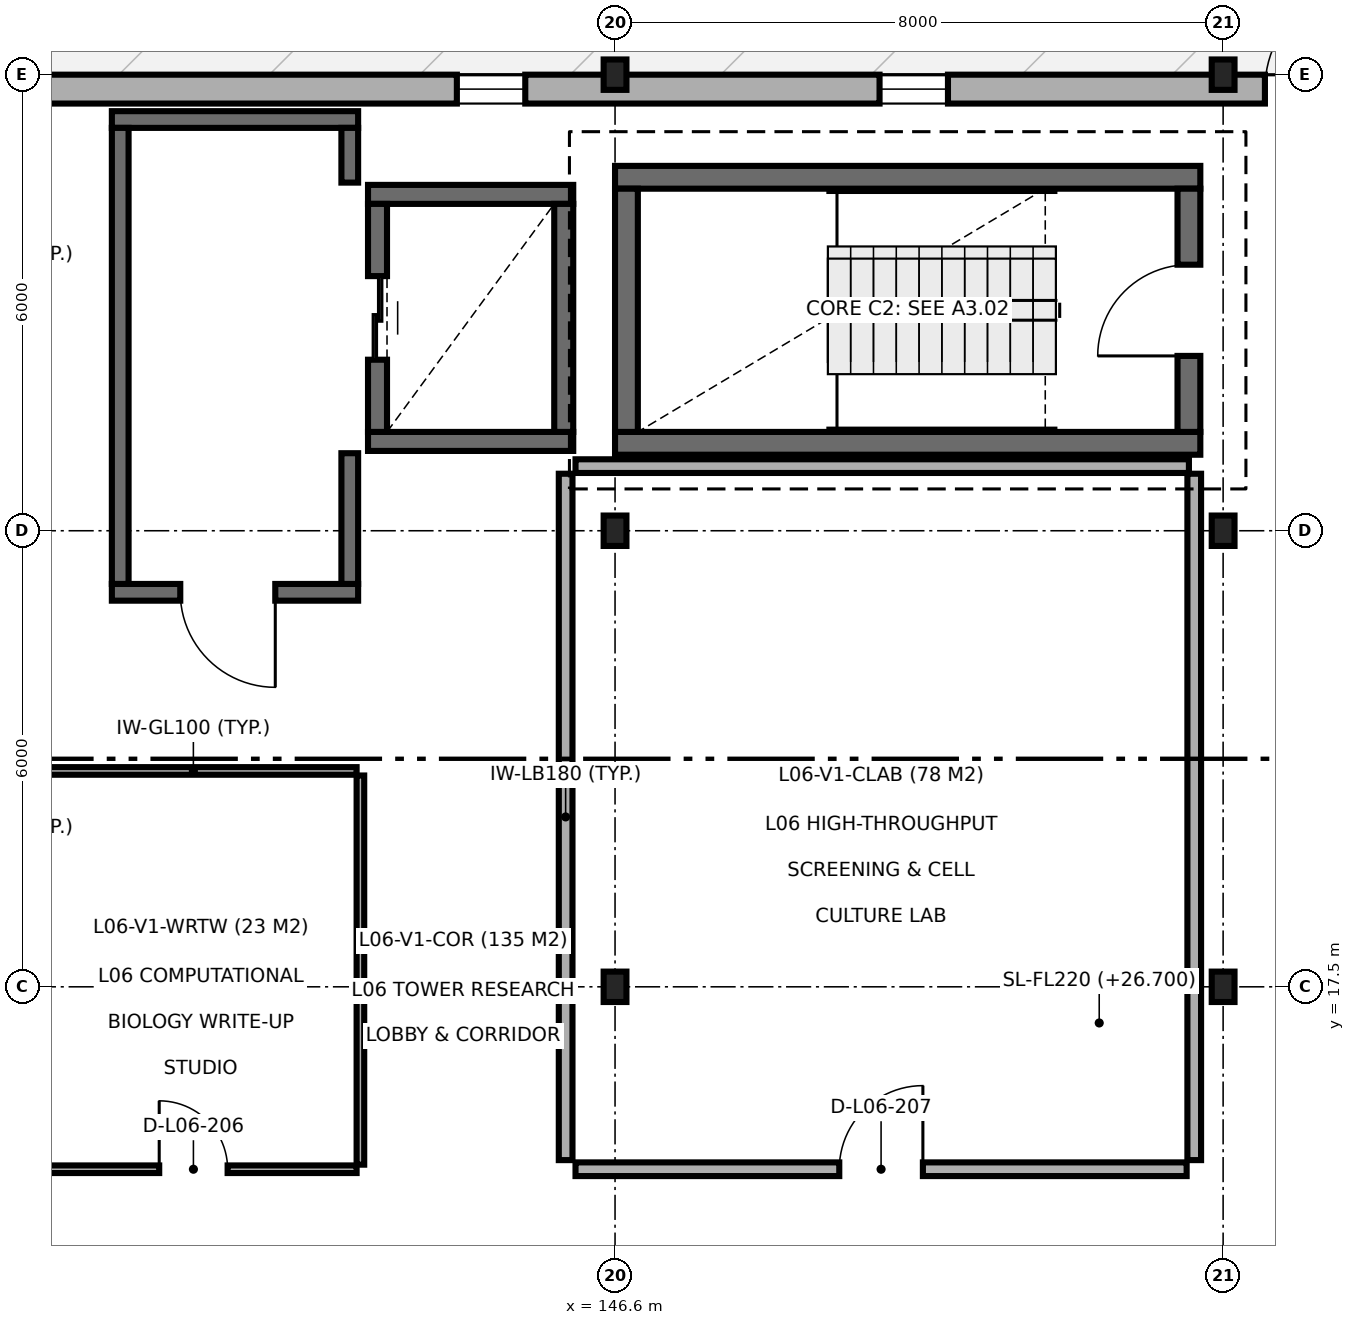
"""IFC4 building model, lengths in metres.
Left out: names, types, materials, properties, quantities, classifications, styles, units other than length and angle.
Written with IfcOpenShell. Run it as: python <this file> out.ifc"""

import sys

from ifc_helpers import new_model, si_unit, direction, frame, frame_2d, origin, origin_2d, place, context, subcontext, project, spatial, rectangle, i_section, extrude, element, fill, save


model = new_model("IFC4")
c1 = context("Model", 3, precision=1e-05, world=origin(), true_north=direction((0.0, 1.0)))
c2 = subcontext(c1, "Body", "Model", "MODEL_VIEW")
j1 = project(units=[si_unit("LENGTHUNIT", "METRE"), si_unit("PLANEANGLEUNIT", "RADIAN")], contexts=[c1])
p1 = place(None, origin())
s1 = spatial("IfcSite", under=j1, at=p1, CompositionType="ELEMENT")
p2 = place(p1, origin())
s2 = spatial("IfcBuilding", under=s1, at=p2, CompositionType="ELEMENT")
p3 = place(p2, frame((0.0, 0.0, 26.7)))
s3 = spatial("IfcBuildingStorey", under=s2, at=p3, CompositionType="ELEMENT", Elevation=26.7)
for number, where, z_axis, x_axis in (
    (1, (146.6, 17.5, 0.0), (0.0, 0.0, 1.0), (1.0, 0.0, 0.0)),
    (2, (146.6, 23.5, 0.0), (0.0, 0.0, 1.0), (1.0, 0.0, 0.0)),
    (3, (146.6, 29.5, 0.0), (0.0, 0.0, 1.0), (1.0, 0.0, 0.0)),
    (4, (154.6, 17.5, 0.0), (0.0, 0.0, 1.0), (1.0, 0.0, 0.0)),
    (5, (154.6, 23.5, 0.0), (0.0, 0.0, 1.0), (1.0, 0.0, 0.0)),
    (6, (154.6, 29.5, 0.0), (0.0, 0.0, 1.0), (1.0, 0.0, 0.0)),
):
    element("IfcColumn", number, at=place(p3, frame(where, z_axis=z_axis, x_axis=x_axis)), inside=s3, PredefinedType="COLUMN", context=c2, shape_type="SweptSolid", body=[
        extrude(i_section(OverallWidth=0.3, OverallDepth=0.4, WebThickness=0.013, FlangeThickness=0.024, FilletRadius=0.027, at=origin_2d()), origin(), (0.0, 0.0, 1.0), 3.9),
    ])
for number, where, z_axis, x_axis in (
    (7, (146.6, 24.65, 0.0), (0.0, 0.0, 1.0), (1.0, 0.0, 0.0)),
    (8, (154.3, 28.15, 0.0), (0.0, 0.0, 1.0), (-1.0, 0.0, 0.0)),
):
    element("IfcWall", number, at=place(p3, frame(where, z_axis=z_axis, x_axis=x_axis)), inside=s3, PredefinedType="SHEAR", context=c2, shape_type="SweptSolid", body=[
        extrude(rectangle(XDim=7.7, YDim=0.3, at=frame_2d((3.85, 0.0))), origin(), (0.0, 0.0, 1.0), 3.9),
    ])
p4 = place(p3, frame((146.75, 28.0, 0.0), z_axis=(0.0, 0.0, 1.0), x_axis=(0.0, -1.0, 0.0)))
e9 = element("IfcWall", 9, at=p4, inside=s3, PredefinedType="SHEAR", context=c2, shape_type="SweptSolid", body=[
    extrude(rectangle(XDim=3.2, YDim=0.3, at=frame_2d((1.6, 0.0))), origin(), (0.0, 0.0, 1.0), 3.9),
])
p5 = place(p3, frame((154.15, 24.8, 0.0), z_axis=(0.0, 0.0, 1.0), x_axis=(0.0, 1.0, 0.0)))
e10 = element("IfcWall", 10, at=p5, inside=s3, PredefinedType="SHEAR", context=c2, shape_type="SweptSolid", body=[
    extrude(rectangle(XDim=3.2, YDim=0.3, at=frame_2d((1.6, 0.0))), origin(), (0.0, 0.0, 1.0), 3.9),
])
p6 = place(p5, frame((1.0, 0.0, 0.0)))
e11 = element("IfcOpeningElement", 11, at=p6, cuts=e10, PredefinedType="OPENING", context=c2, shape_type="SweptSolid", body=[
    extrude(rectangle(XDim=1.2, YDim=2.15, at=frame_2d((0.6, 1.075))), frame((0.0, 0.16, 0.0), z_axis=(0.0, -1.0, 0.0), x_axis=(1.0, 0.0, 0.0)), (0.0, 0.0, 1.0), 0.32),
])
for number, where, z_axis, x_axis in (
    (12, (143.35, 24.675, 0.0), (0.0, 0.0, 1.0), (1.0, 0.0, 0.0)),
    (13, (146.05, 27.925, 0.0), (0.0, 0.0, 1.0), (-1.0, 0.0, 0.0)),
):
    element("IfcWall", number, at=place(p3, frame(where, z_axis=z_axis, x_axis=x_axis)), inside=s3, PredefinedType="SHEAR", context=c2, shape_type="SweptSolid", body=[
        extrude(rectangle(XDim=2.7, YDim=0.25, at=frame_2d((1.35, 0.0))), origin(), (0.0, 0.0, 1.0), 3.9),
    ])
p7 = place(p3, frame((143.475, 27.8, 0.0), z_axis=(0.0, 0.0, 1.0), x_axis=(0.0, -1.0, 0.0)))
e14 = element("IfcWall", 14, at=p7, inside=s3, PredefinedType="SHEAR", context=c2, shape_type="SweptSolid", body=[
    extrude(rectangle(XDim=3.0, YDim=0.25, at=frame_2d((1.5, 0.0))), origin(), (0.0, 0.0, 1.0), 3.9),
])
p8 = place(p7, frame((0.95, 0.0, 0.0)))
e15 = element("IfcOpeningElement", 15, at=p8, cuts=e14, PredefinedType="OPENING", context=c2, shape_type="SweptSolid", body=[
    extrude(rectangle(XDim=1.1, YDim=2.15, at=frame_2d((0.55, 1.075))), frame((0.0, 0.135, 0.0), z_axis=(0.0, -1.0, 0.0), x_axis=(1.0, 0.0, 0.0)), (0.0, 0.0, 1.0), 0.27),
])
p9 = place(p3, frame((145.925, 24.8, 0.0), z_axis=(0.0, 0.0, 1.0), x_axis=(0.0, 1.0, 0.0)))
e16 = element("IfcWall", 16, at=p9, inside=s3, PredefinedType="SHEAR", context=c2, shape_type="SweptSolid", body=[
    extrude(rectangle(XDim=3.0, YDim=0.25, at=frame_2d((1.5, 0.0))), origin(), (0.0, 0.0, 1.0), 3.9),
])
p10 = place(p3, frame((139.98, 22.69, 0.0), z_axis=(0.0, 0.0, 1.0), x_axis=(1.0, 0.0, 0.0)))
e17 = element("IfcWall", 17, at=p10, inside=s3, PredefinedType="SOLIDWALL", context=c2, shape_type="SweptSolid", body=[
    extrude(rectangle(XDim=3.24, YDim=0.22, at=frame_2d((1.62, 0.0))), origin(), (0.0, 0.0, 1.0), 3.68),
])
p11 = place(p10, frame((0.9, 0.0, 0.0)))
e18 = element("IfcOpeningElement", 18, at=p11, cuts=e17, PredefinedType="OPENING", context=c2, shape_type="SweptSolid", body=[
    extrude(rectangle(XDim=1.25, YDim=2.15, at=frame_2d((0.625, 1.075))), frame((0.0, 0.12, 0.0), z_axis=(0.0, -1.0, 0.0), x_axis=(1.0, 0.0, 0.0)), (0.0, 0.0, 1.0), 0.24),
])
p12 = place(p3, frame((143.22, 28.91, 0.0), z_axis=(0.0, 0.0, 1.0), x_axis=(-1.0, 0.0, 0.0)))
e19 = element("IfcWall", 19, at=p12, inside=s3, PredefinedType="SOLIDWALL", context=c2, shape_type="SweptSolid", body=[
    extrude(rectangle(XDim=3.24, YDim=0.22, at=frame_2d((1.62, 0.0))), origin(), (0.0, 0.0, 1.0), 3.68),
])
p13 = place(p3, frame((140.09, 28.8, 0.0), z_axis=(0.0, 0.0, 1.0), x_axis=(0.0, -1.0, 0.0)))
e20 = element("IfcWall", 20, at=p13, inside=s3, PredefinedType="SOLIDWALL", context=c2, shape_type="SweptSolid", body=[
    extrude(rectangle(XDim=6.0, YDim=0.22, at=frame_2d((3.0, 0.0))), origin(), (0.0, 0.0, 1.0), 3.68),
])
p14 = place(p3, frame((143.11, 22.8, 0.0), z_axis=(0.0, 0.0, 1.0), x_axis=(0.0, 1.0, 0.0)))
e21 = element("IfcWall", 21, at=p14, inside=s3, PredefinedType="SOLIDWALL", context=c2, shape_type="SweptSolid", body=[
    extrude(rectangle(XDim=1.72, YDim=0.22, at=frame_2d((0.86, 0.0))), origin(), (0.0, 0.0, 1.0), 3.68),
])
p15 = place(p3, frame((143.11, 28.08, 0.0), z_axis=(0.0, 0.0, 1.0), x_axis=(0.0, 1.0, 0.0)))
e22 = element("IfcWall", 22, at=p15, inside=s3, PredefinedType="SOLIDWALL", context=c2, shape_type="SweptSolid", body=[
    extrude(rectangle(XDim=0.72, YDim=0.22, at=frame_2d((0.36, 0.0))), origin(), (0.0, 0.0, 1.0), 3.68),
])
p16 = place(p3, frame((167.016, 29.31, 0.0), z_axis=(0.0, 0.0, 1.0), x_axis=(-1.0, 0.0, 0.0)))
e23 = element("IfcWall", 23, at=p16, inside=s3, PredefinedType="SOLIDWALL", context=c2, shape_type="SweptSolid", body=[
    extrude(rectangle(XDim=28.416, YDim=0.38, at=frame_2d((14.208, 0.0))), origin(), (0.0, 0.0, 1.0), 3.68),
])
p17 = place(p16, frame((10.466, 0.0, 0.0)))
e24 = element("IfcOpeningElement", 24, at=p17, cuts=e23, PredefinedType="OPENING", context=c2, shape_type="SweptSolid", body=[
    extrude(rectangle(XDim=1.4, YDim=2.2, at=frame_2d((0.7, 1.1))), frame((0.0, 0.2, 0.0), z_axis=(0.0, -1.0, 0.0), x_axis=(1.0, 0.0, 0.0)), (0.0, 0.0, 1.0), 0.4),
])
p18 = place(p16, frame((4.778, 0.0, 0.9)))
e25 = element("IfcOpeningElement", 25, at=p18, cuts=e23, PredefinedType="OPENING", context=c2, shape_type="SweptSolid", body=[
    extrude(rectangle(XDim=0.9, YDim=1.8, at=frame_2d((0.45, 0.9))), frame((0.0, 0.2, 0.0), z_axis=(0.0, -1.0, 0.0), x_axis=(1.0, 0.0, 0.0)), (0.0, 0.0, 1.0), 0.4),
])
p19 = place(p16, frame((16.036, 0.0, 0.9)))
e26 = element("IfcOpeningElement", 26, at=p19, cuts=e23, PredefinedType="OPENING", context=c2, shape_type="SweptSolid", body=[
    extrude(rectangle(XDim=0.9, YDim=1.8, at=frame_2d((0.45, 0.9))), frame((0.0, 0.2, 0.0), z_axis=(0.0, -1.0, 0.0), x_axis=(1.0, 0.0, 0.0)), (0.0, 0.0, 1.0), 0.4),
])
p20 = place(p16, frame((21.597, 0.0, 0.9)))
e27 = element("IfcOpeningElement", 27, at=p20, cuts=e23, PredefinedType="OPENING", context=c2, shape_type="SweptSolid", body=[
    extrude(rectangle(XDim=0.9, YDim=1.8, at=frame_2d((0.45, 0.9))), frame((0.0, 0.2, 0.0), z_axis=(0.0, -1.0, 0.0), x_axis=(1.0, 0.0, 0.0)), (0.0, 0.0, 1.0), 0.4),
])
p21 = place(p3, frame((138.905, 20.34, 0.0), z_axis=(0.0, 0.0, 1.0), x_axis=(1.0, 0.0, 0.0)))
e28 = element("IfcWall", 28, at=p21, inside=s3, PredefinedType="PARTITIONING", context=c2, shape_type="SweptSolid", body=[
    extrude(rectangle(XDim=4.295, YDim=0.1, at=frame_2d((2.147, 0.0))), origin(), (0.0, 0.0, 1.0), 3.68),
])
p22 = place(p3, frame((143.25, 15.16, 0.0), z_axis=(0.0, 0.0, 1.0), x_axis=(0.0, 1.0, 0.0)))
e29 = element("IfcWall", 29, at=p22, inside=s3, PredefinedType="PARTITIONING", context=c2, shape_type="SweptSolid", body=[
    extrude(rectangle(XDim=5.12, YDim=0.1, at=frame_2d((2.56, 0.0))), origin(), (0.0, 0.0, 1.0), 3.68),
])
p23 = place(p3, frame((138.905, 15.1, 0.0), z_axis=(0.0, 0.0, 1.0), x_axis=(1.0, 0.0, 0.0)))
e30 = element("IfcWall", 30, at=p23, inside=s3, PredefinedType="PARTITIONING", context=c2, shape_type="SweptSolid", body=[
    extrude(rectangle(XDim=4.295, YDim=0.1, at=frame_2d((2.147, 0.0))), origin(), (0.0, 0.0, 1.0), 3.68),
])
p24 = place(p23, frame((1.698, 0.0, 0.0)))
e31 = element("IfcOpeningElement", 31, at=p24, cuts=e30, PredefinedType="OPENING", context=c2, shape_type="SweptSolid", body=[
    extrude(rectangle(XDim=0.9, YDim=2.1, at=frame_2d((0.45, 1.05))), frame((0.0, 0.06, 0.0), z_axis=(0.0, -1.0, 0.0), x_axis=(1.0, 0.0, 0.0)), (0.0, 0.0, 1.0), 0.12),
])
p25 = place(p3, frame((145.95, 15.22, 0.0), z_axis=(0.0, 0.0, 1.0), x_axis=(0.0, 1.0, 0.0)))
e32 = element("IfcWall", 32, at=p25, inside=s3, PredefinedType="PARTITIONING", context=c2, shape_type="SweptSolid", body=[
    extrude(rectangle(XDim=9.03, YDim=0.18, at=frame_2d((4.515, 0.0))), origin(), (0.0, 0.0, 1.0), 3.68),
])
p26 = place(p3, frame((146.08, 24.35, 0.0), z_axis=(0.0, 0.0, 1.0), x_axis=(1.0, 0.0, 0.0)))
e33 = element("IfcWall", 33, at=p26, inside=s3, PredefinedType="PARTITIONING", context=c2, shape_type="SweptSolid", body=[
    extrude(rectangle(XDim=8.07, YDim=0.18, at=frame_2d((4.035, 0.0))), origin(), (0.0, 0.0, 1.0), 2.91),
])
p27 = place(p3, frame((154.22, 15.22, 0.0), z_axis=(0.0, 0.0, 1.0), x_axis=(0.0, 1.0, 0.0)))
e34 = element("IfcWall", 34, at=p27, inside=s3, PredefinedType="PARTITIONING", context=c2, shape_type="SweptSolid", body=[
    extrude(rectangle(XDim=9.03, YDim=0.18, at=frame_2d((4.515, 0.0))), origin(), (0.0, 0.0, 1.0), 3.68),
])
p28 = place(p3, frame((146.08, 15.1, 0.0), z_axis=(0.0, 0.0, 1.0), x_axis=(1.0, 0.0, 0.0)))
e35 = element("IfcWall", 35, at=p28, inside=s3, PredefinedType="PARTITIONING", context=c2, shape_type="SweptSolid", body=[
    extrude(rectangle(XDim=8.04, YDim=0.18, at=frame_2d((4.02, 0.0))), origin(), (0.0, 0.0, 1.0), 3.68),
])
p29 = place(p28, frame((3.47, 0.0, 0.0)))
e36 = element("IfcOpeningElement", 36, at=p29, cuts=e35, PredefinedType="OPENING", context=c2, shape_type="SweptSolid", body=[
    extrude(rectangle(XDim=1.1, YDim=2.15, at=frame_2d((0.55, 1.075))), frame((0.0, 0.1, 0.0), z_axis=(0.0, -1.0, 0.0), x_axis=(1.0, 0.0, 0.0)), (0.0, 0.0, 1.0), 0.2),
])
p30 = place(p6, origin())
e37 = element("IfcDoor", 37, at=p30, inside=s3, OperationType="SINGLE_SWING_LEFT", PredefinedType="DOOR", context=c2, shape_type="SweptSolid", body=[
    extrude(rectangle(XDim=1.2, YDim=2.15, at=frame_2d((0.6, 1.075))), frame((0.0, 0.025, 0.0), z_axis=(0.0, -1.0, 0.0), x_axis=(1.0, 0.0, 0.0)), (0.0, 0.0, 1.0), 0.05),
])
fill(e11, e37)
p31 = place(p8, origin())
e38 = element("IfcDoor", 38, at=p31, inside=s3, OperationType="DOUBLE_DOOR_SLIDING", PredefinedType="DOOR", context=c2, shape_type="SweptSolid", body=[
    extrude(rectangle(XDim=1.1, YDim=2.15, at=frame_2d((0.55, 1.075))), frame((0.0, 0.025, 0.0), z_axis=(0.0, -1.0, 0.0), x_axis=(1.0, 0.0, 0.0)), (0.0, 0.0, 1.0), 0.05),
])
fill(e15, e38)
p32 = place(p11, frame((1.25, 0.0, 0.0), z_axis=(0.0, 0.0, 1.0), x_axis=(-1.0, 0.0, 0.0)))
e39 = element("IfcDoor", 39, at=p32, inside=s3, OperationType="SINGLE_SWING_RIGHT", PredefinedType="DOOR", context=c2, shape_type="SweptSolid", body=[
    extrude(rectangle(XDim=1.25, YDim=2.15, at=frame_2d((0.625, 1.075))), frame((0.0, 0.025, 0.0), z_axis=(0.0, -1.0, 0.0), x_axis=(1.0, 0.0, 0.0)), (0.0, 0.0, 1.0), 0.05),
])
fill(e18, e39)
p33 = place(p17, frame((1.4, 0.0, 0.0), z_axis=(0.0, 0.0, 1.0), x_axis=(-1.0, 0.0, 0.0)))
e40 = element("IfcDoor", 40, at=p33, inside=s3, OperationType="SINGLE_SWING_LEFT", PredefinedType="DOOR", context=c2, shape_type="SweptSolid", body=[
    extrude(rectangle(XDim=1.4, YDim=2.2, at=frame_2d((0.7, 1.1))), frame((0.0, 0.025, 0.0), z_axis=(0.0, -1.0, 0.0), x_axis=(1.0, 0.0, 0.0)), (0.0, 0.0, 1.0), 0.05),
])
fill(e24, e40)
p34 = place(p19, origin())
e41 = element("IfcWindow", 41, at=p34, inside=s3, PartitioningType="SINGLE_PANEL", PredefinedType="WINDOW", context=c2, shape_type="SweptSolid", body=[
    extrude(rectangle(XDim=0.9, YDim=1.8, at=frame_2d((0.45, 0.9))), frame((0.0, 0.03, 0.0), z_axis=(0.0, -1.0, 0.0), x_axis=(1.0, 0.0, 0.0)), (0.0, 0.0, 1.0), 0.06),
])
fill(e26, e41)
p35 = place(p20, origin())
e42 = element("IfcWindow", 42, at=p35, inside=s3, PartitioningType="SINGLE_PANEL", PredefinedType="WINDOW", context=c2, shape_type="SweptSolid", body=[
    extrude(rectangle(XDim=0.9, YDim=1.8, at=frame_2d((0.45, 0.9))), frame((0.0, 0.03, 0.0), z_axis=(0.0, -1.0, 0.0), x_axis=(1.0, 0.0, 0.0)), (0.0, 0.0, 1.0), 0.06),
])
fill(e27, e42)
p36 = place(p24, origin())
e43 = element("IfcDoor", 43, at=p36, inside=s3, OperationType="SINGLE_SWING_LEFT", PredefinedType="DOOR", context=c2, shape_type="SweptSolid", body=[
    extrude(rectangle(XDim=0.9, YDim=2.1, at=frame_2d((0.45, 1.05))), frame((0.0, 0.025, 0.0), z_axis=(0.0, -1.0, 0.0), x_axis=(1.0, 0.0, 0.0)), (0.0, 0.0, 1.0), 0.05),
])
fill(e31, e43)
p37 = place(p29, origin())
e44 = element("IfcDoor", 44, at=p37, inside=s3, OperationType="SINGLE_SWING_RIGHT", PredefinedType="DOOR", context=c2, shape_type="SweptSolid", body=[
    extrude(rectangle(XDim=1.1, YDim=2.15, at=frame_2d((0.55, 1.075))), frame((0.0, 0.025, 0.0), z_axis=(0.0, -1.0, 0.0), x_axis=(1.0, 0.0, 0.0)), (0.0, 0.0, 1.0), 0.05),
])
fill(e36, e44)
save(model, sys.argv[1])
